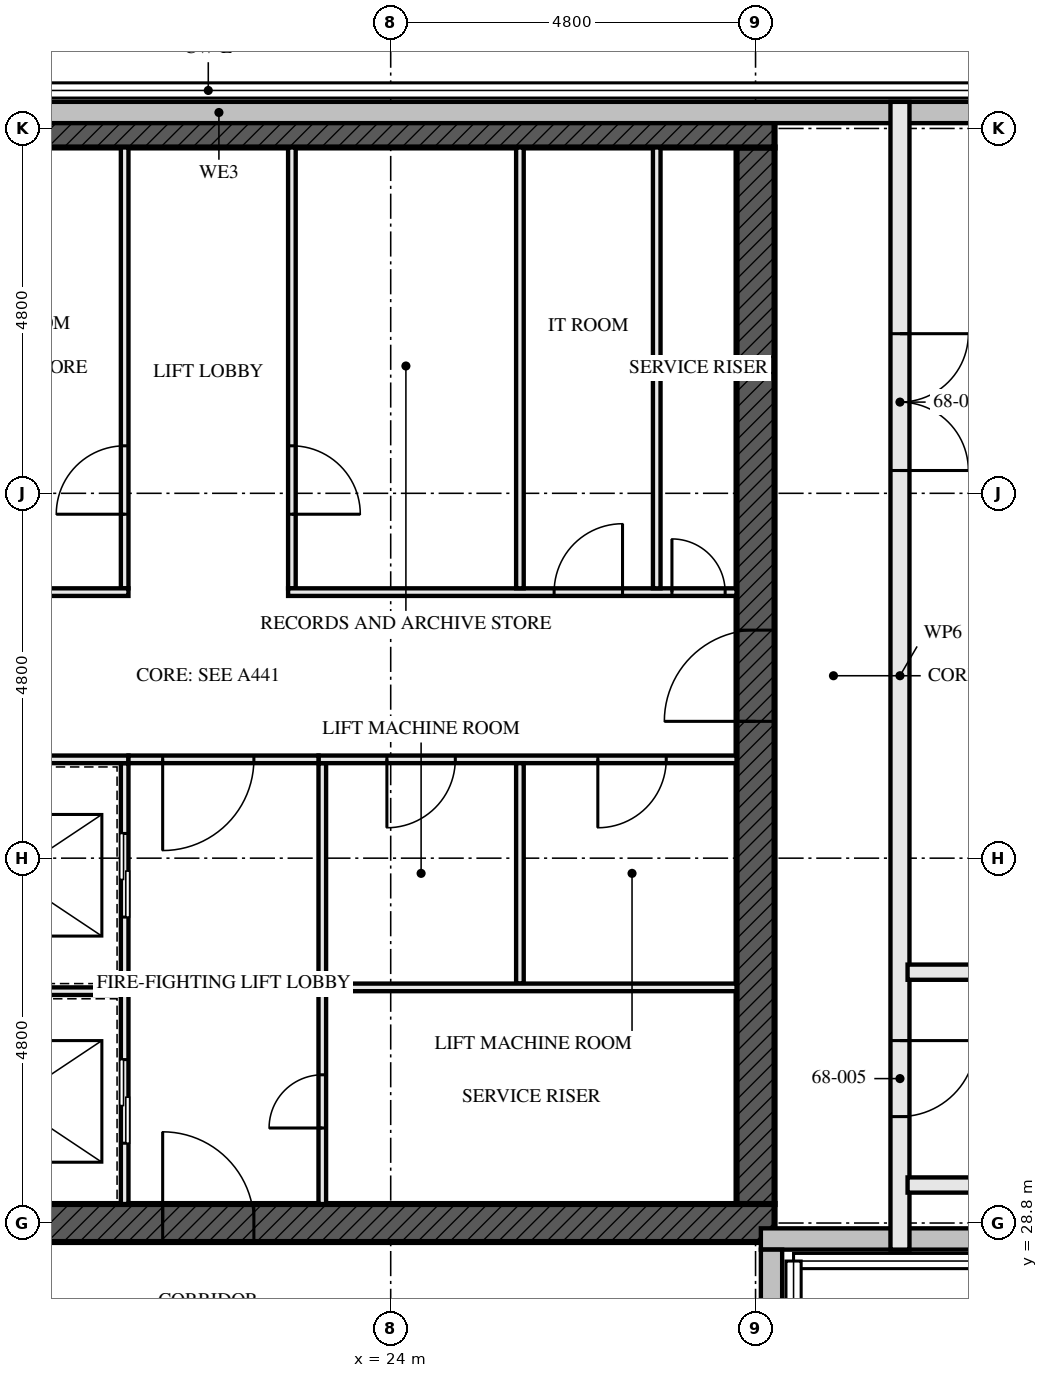
"""IFC4 building model, lengths in metres.
Left out: names, types, materials, properties, quantities, classifications, styles, units other than length and angle.
Written with IfcOpenShell. Run it as: python <this file> out.ifc"""

import sys

from ifc_helpers import new_model, si_unit, direction, frame, frame_2d, origin, place, context, subcontext, project, spatial, rectangle, extrude, element, fill, save


model = new_model("IFC4")
c1 = context("Model", 3, precision=1e-05, world=origin(), true_north=direction((0.0, 1.0)))
c2 = subcontext(c1, "Body", "Model", "MODEL_VIEW")
j1 = project(units=[si_unit("LENGTHUNIT", "METRE"), si_unit("PLANEANGLEUNIT", "RADIAN")], contexts=[c1])
p1 = place(None, origin())
s1 = spatial("IfcSite", under=j1, at=p1, CompositionType="ELEMENT")
p2 = place(p1, origin())
s2 = spatial("IfcBuilding", under=s1, at=p2, CompositionType="ELEMENT")
p3 = place(p2, frame((0.0, 0.0, 248.0)))
s3 = spatial("IfcBuildingStorey", under=s2, at=p3, CompositionType="ELEMENT", Elevation=248.0)
p4 = place(p3, frame((14.15, 28.8, -0.25), z_axis=(0.0, 0.0, 1.0), x_axis=(1.0, 0.0, 0.0)))
e1 = element("IfcWall", 1, at=p4, inside=s3, PredefinedType="SHEAR", context=c2, shape_type="SweptSolid", body=[
    extrude(rectangle(XDim=14.9, YDim=0.5, at=frame_2d((7.45, 0.0))), origin(), (0.0, 0.0, 1.0), 4.5),
])
p5 = place(p4, frame((6.85, 0.0, 0.25)))
e2 = element("IfcOpeningElement", 2, at=p5, cuts=e1, PredefinedType="OPENING", context=c2, shape_type="SweptSolid", body=[
    extrude(rectangle(XDim=1.2, YDim=2.1, at=frame_2d((0.6, 1.05))), frame((0.0, 0.26, 0.0), z_axis=(0.0, -1.0, 0.0), x_axis=(1.0, 0.0, 0.0)), (0.0, 0.0, 1.0), 0.521),
])
p6 = place(p3, frame((29.05, 43.2, -0.25), z_axis=(0.0, 0.0, 1.0), x_axis=(-1.0, 0.0, 0.0)))
e3 = element("IfcWall", 3, at=p6, inside=s3, PredefinedType="SHEAR", context=c2, shape_type="SweptSolid", body=[
    extrude(rectangle(XDim=14.9, YDim=0.5, at=frame_2d((7.45, 0.0))), origin(), (0.0, 0.0, 1.0), 4.5),
])
p7 = place(p3, frame((28.8, 29.05, -0.25), z_axis=(0.0, 0.0, 1.0), x_axis=(0.0, 1.0, 0.0)))
e4 = element("IfcWall", 4, at=p7, inside=s3, PredefinedType="SHEAR", context=c2, shape_type="SweptSolid", body=[
    extrude(rectangle(XDim=13.9, YDim=0.5, at=frame_2d((6.95, 0.0))), origin(), (0.0, 0.0, 1.0), 4.5),
])
p8 = place(p7, frame((6.35, 0.0, 0.25)))
e5 = element("IfcOpeningElement", 5, at=p8, cuts=e4, PredefinedType="OPENING", context=c2, shape_type="SweptSolid", body=[
    extrude(rectangle(XDim=1.2, YDim=2.1, at=frame_2d((0.6, 1.05))), frame((0.0, 0.26, 0.0), z_axis=(0.0, -1.0, 0.0), x_axis=(1.0, 0.0, 0.0)), (0.0, 0.0, 1.0), 0.521),
])
p9 = place(p3, frame((28.87, 28.59, 4.5), z_axis=(0.0, 0.0, 1.0), x_axis=(1.0, 0.0, 0.0)))
e6 = element("IfcWall", 6, at=p9, inside=s3, PredefinedType="PARAPET", context=c2, shape_type="SweptSolid", body=[
    extrude(rectangle(XDim=9.6, YDim=0.28, at=frame_2d((4.8, 0.0))), origin(), (0.0, 0.0, 1.0), 1.1),
])
p10 = place(p3, frame((38.75, 43.41, 4.5), z_axis=(0.0, 0.0, 1.0), x_axis=(-1.0, 0.0, 0.0)))
e7 = element("IfcWall", 7, at=p10, inside=s3, PredefinedType="PARAPET", context=c2, shape_type="SweptSolid", body=[
    extrude(rectangle(XDim=34.02, YDim=0.28, at=frame_2d((17.01, 0.0))), origin(), (0.0, 0.0, 1.0), 1.1),
])
p11 = place(p3, frame((29.01, 18.85, 4.5), z_axis=(0.0, 0.0, 1.0), x_axis=(0.0, 1.0, 0.0)))
e8 = element("IfcWall", 8, at=p11, inside=s3, PredefinedType="PARAPET", context=c2, shape_type="SweptSolid", body=[
    extrude(rectangle(XDim=9.6, YDim=0.28, at=frame_2d((4.8, 0.0))), origin(), (0.0, 0.0, 1.0), 1.1),
])
for number, where, z_axis, x_axis in (
    (9, (37.0, 29.3, 0.0), (0.0, 0.0, 1.0), (-1.0, 0.0, 0.0)),
    (10, (37.0, 32.1, 0.0), (0.0, 0.0, 1.0), (-1.0, 0.0, 0.0)),
):
    element("IfcWall", number, at=place(p3, frame(where, z_axis=z_axis, x_axis=x_axis)), inside=s3, PredefinedType="SOLIDWALL", context=c2, shape_type="SweptSolid", body=[
        extrude(rectangle(XDim=6.2, YDim=0.2, at=frame_2d((3.1, 0.0))), origin(), (0.0, 0.0, 1.0), 4.25),
    ])
p12 = place(p3, frame((30.7, 28.45, 0.0), z_axis=(0.0, 0.0, 1.0), x_axis=(0.0, 1.0, 0.0)))
e11 = element("IfcWall", 11, at=p12, inside=s3, PredefinedType="SOLIDWALL", context=c2, shape_type="SweptSolid", body=[
    extrude(rectangle(XDim=15.1, YDim=0.25, at=frame_2d((7.55, 0.0))), origin(), (0.0, 0.0, 1.0), 3.34),
])
p13 = place(p12, frame((1.75, 0.0, 0.0)))
e12 = element("IfcOpeningElement", 12, at=p13, cuts=e11, PredefinedType="OPENING", context=c2, shape_type="SweptSolid", body=[
    extrude(rectangle(XDim=1.0, YDim=2.1, at=frame_2d((0.5, 1.05))), frame((0.0, 0.135, 0.0), z_axis=(0.0, -1.0, 0.0), x_axis=(1.0, 0.0, 0.0)), (0.0, 0.0, 1.0), 0.271),
])
p14 = place(p12, frame((10.25, 0.0, 0.0)))
e13 = element("IfcOpeningElement", 13, at=p14, cuts=e11, PredefinedType="OPENING", context=c2, shape_type="SweptSolid", body=[
    extrude(rectangle(XDim=1.8, YDim=2.4, at=frame_2d((0.9, 1.2))), frame((0.0, 0.135, 0.0), z_axis=(0.0, -1.0, 0.0), x_axis=(1.0, 0.0, 0.0)), (0.0, 0.0, 1.0), 0.271),
])
p15 = place(p3, frame((27.5, 37.15, 0.0), z_axis=(0.0, 0.0, 1.0), x_axis=(0.0, 1.0, 0.0)))
e14 = element("IfcWall", 14, at=p15, inside=s3, PredefinedType="SOLIDWALL", context=c2, shape_type="SweptSolid", body=[
    extrude(rectangle(XDim=5.8, YDim=0.1, at=frame_2d((2.9, 0.0))), origin(), (0.0, 0.0, 1.0), 4.25),
])
p16 = place(p3, frame((20.5, 29.05, 0.0), z_axis=(0.0, 0.0, 1.0), x_axis=(0.0, 1.0, 0.0)))
e15 = element("IfcWall", 15, at=p16, inside=s3, PredefinedType="SOLIDWALL", context=c2, shape_type="SweptSolid", body=[
    extrude(rectangle(XDim=5.8, YDim=0.1, at=frame_2d((2.9, 0.0))), origin(), (0.0, 0.0, 1.0), 4.25),
])
p17 = place(p16, frame((0.8, 0.0, 0.0)))
e16 = element("IfcOpeningElement", 16, at=p17, cuts=e15, PredefinedType="OPENING", context=c2, shape_type="SweptSolid", body=[
    extrude(rectangle(XDim=1.1, YDim=2.3, at=frame_2d((0.55, 1.15))), frame((0.0, 0.061, 0.0), z_axis=(0.0, -1.0, 0.0), x_axis=(1.0, 0.0, 0.0)), (0.0, 0.0, 1.0), 0.121),
])
p18 = place(p16, frame((3.775, 0.0, 0.0)))
e17 = element("IfcOpeningElement", 17, at=p18, cuts=e15, PredefinedType="OPENING", context=c2, shape_type="SweptSolid", body=[
    extrude(rectangle(XDim=1.1, YDim=2.3, at=frame_2d((0.55, 1.15))), frame((0.0, 0.061, 0.0), z_axis=(0.0, -1.0, 0.0), x_axis=(1.0, 0.0, 0.0)), (0.0, 0.0, 1.0), 0.121),
])
p19 = place(p3, frame((20.5, 37.15, 0.0), z_axis=(0.0, 0.0, 1.0), x_axis=(0.0, 1.0, 0.0)))
e18 = element("IfcWall", 18, at=p19, inside=s3, PredefinedType="SOLIDWALL", context=c2, shape_type="SweptSolid", body=[
    extrude(rectangle(XDim=5.8, YDim=0.1, at=frame_2d((2.9, 0.0))), origin(), (0.0, 0.0, 1.0), 4.25),
])
p20 = place(p19, frame((0.975, 0.0, 0.0)))
e19 = element("IfcOpeningElement", 19, at=p20, cuts=e18, PredefinedType="OPENING", context=c2, shape_type="SweptSolid", body=[
    extrude(rectangle(XDim=0.9, YDim=2.1, at=frame_2d((0.45, 1.05))), frame((0.0, 0.061, 0.0), z_axis=(0.0, -1.0, 0.0), x_axis=(1.0, 0.0, 0.0)), (0.0, 0.0, 1.0), 0.121),
])
p21 = place(p3, frame((22.7, 37.15, 0.0), z_axis=(0.0, 0.0, 1.0), x_axis=(0.0, 1.0, 0.0)))
e20 = element("IfcWall", 20, at=p21, inside=s3, PredefinedType="SOLIDWALL", context=c2, shape_type="SweptSolid", body=[
    extrude(rectangle(XDim=5.8, YDim=0.1, at=frame_2d((2.9, 0.0))), origin(), (0.0, 0.0, 1.0), 4.25),
])
p22 = place(p21, frame((0.975, 0.0, 0.0)))
e21 = element("IfcOpeningElement", 21, at=p22, cuts=e20, PredefinedType="OPENING", context=c2, shape_type="SweptSolid", body=[
    extrude(rectangle(XDim=0.9, YDim=2.1, at=frame_2d((0.45, 1.05))), frame((0.0, 0.061, 0.0), z_axis=(0.0, -1.0, 0.0), x_axis=(1.0, 0.0, 0.0)), (0.0, 0.0, 1.0), 0.121),
])
p23 = place(p3, frame((23.1, 29.05, 0.0), z_axis=(0.0, 0.0, 1.0), x_axis=(0.0, 1.0, 0.0)))
e22 = element("IfcWall", 22, at=p23, inside=s3, PredefinedType="SOLIDWALL", context=c2, shape_type="SweptSolid", body=[
    extrude(rectangle(XDim=5.8, YDim=0.1, at=frame_2d((2.9, 0.0))), origin(), (0.0, 0.0, 1.0), 4.25),
])
p24 = place(p23, frame((1.0, 0.0, 0.0)))
e23 = element("IfcOpeningElement", 23, at=p24, cuts=e22, PredefinedType="OPENING", context=c2, shape_type="SweptSolid", body=[
    extrude(rectangle(XDim=0.7, YDim=2.1, at=frame_2d((0.35, 1.05))), frame((0.0, 0.061, 0.0), z_axis=(0.0, -1.0, 0.0), x_axis=(1.0, 0.0, 0.0)), (0.0, 0.0, 1.0), 0.121),
])
p25 = place(p3, frame((14.65, 34.9, 0.0), z_axis=(0.0, 0.0, 1.0), x_axis=(1.0, 0.0, 0.0)))
e24 = element("IfcWall", 24, at=p25, inside=s3, PredefinedType="SOLIDWALL", context=c2, shape_type="SweptSolid", body=[
    extrude(rectangle(XDim=5.9, YDim=0.1, at=frame_2d((2.95, 0.0))), origin(), (0.0, 0.0, 1.0), 4.25),
])
p26 = place(p25, frame((1.6, 0.0, 0.0)))
e25 = element("IfcOpeningElement", 25, at=p26, cuts=e24, PredefinedType="OPENING", context=c2, shape_type="SweptSolid", body=[
    extrude(rectangle(XDim=0.7, YDim=2.1, at=frame_2d((0.35, 1.05))), frame((0.0, 0.061, 0.0), z_axis=(0.0, -1.0, 0.0), x_axis=(1.0, 0.0, 0.0)), (0.0, 0.0, 1.0), 0.121),
])
p27 = place(p3, frame((23.05, 34.9, 0.0), z_axis=(0.0, 0.0, 1.0), x_axis=(1.0, 0.0, 0.0)))
e26 = element("IfcWall", 26, at=p27, inside=s3, PredefinedType="SOLIDWALL", context=c2, shape_type="SweptSolid", body=[
    extrude(rectangle(XDim=5.5, YDim=0.1, at=frame_2d((2.75, 0.0))), origin(), (0.0, 0.0, 1.0), 4.25),
])
p28 = place(p27, frame((0.9, 0.0, 0.0)))
e27 = element("IfcOpeningElement", 27, at=p28, cuts=e26, PredefinedType="OPENING", context=c2, shape_type="SweptSolid", body=[
    extrude(rectangle(XDim=0.9, YDim=2.1, at=frame_2d((0.45, 1.05))), frame((0.0, 0.061, 0.0), z_axis=(0.0, -1.0, 0.0), x_axis=(1.0, 0.0, 0.0)), (0.0, 0.0, 1.0), 0.121),
])
p29 = place(p27, frame((3.675, 0.0, 0.0)))
e28 = element("IfcOpeningElement", 28, at=p29, cuts=e26, PredefinedType="OPENING", context=c2, shape_type="SweptSolid", body=[
    extrude(rectangle(XDim=0.9, YDim=2.1, at=frame_2d((0.45, 1.05))), frame((0.0, 0.061, 0.0), z_axis=(0.0, -1.0, 0.0), x_axis=(1.0, 0.0, 0.0)), (0.0, 0.0, 1.0), 0.121),
])
p30 = place(p3, frame((14.65, 37.1, 0.0), z_axis=(0.0, 0.0, 1.0), x_axis=(1.0, 0.0, 0.0)))
e29 = element("IfcWall", 29, at=p30, inside=s3, PredefinedType="SOLIDWALL", context=c2, shape_type="SweptSolid", body=[
    extrude(rectangle(XDim=5.9, YDim=0.1, at=frame_2d((2.95, 0.0))), origin(), (0.0, 0.0, 1.0), 4.25),
])
p31 = place(p30, frame((0.15, 0.0, 0.0)))
e30 = element("IfcOpeningElement", 30, at=p31, cuts=e29, PredefinedType="OPENING", context=c2, shape_type="SweptSolid", body=[
    extrude(rectangle(XDim=0.7, YDim=2.1, at=frame_2d((0.35, 1.05))), frame((0.0, 0.061, 0.0), z_axis=(0.0, -1.0, 0.0), x_axis=(1.0, 0.0, 0.0)), (0.0, 0.0, 1.0), 0.121),
])
p32 = place(p30, frame((1.5, 0.0, 0.0)))
e31 = element("IfcOpeningElement", 31, at=p32, cuts=e29, PredefinedType="OPENING", context=c2, shape_type="SweptSolid", body=[
    extrude(rectangle(XDim=0.9, YDim=2.1, at=frame_2d((0.45, 1.05))), frame((0.0, 0.061, 0.0), z_axis=(0.0, -1.0, 0.0), x_axis=(1.0, 0.0, 0.0)), (0.0, 0.0, 1.0), 0.121),
])
p33 = place(p3, frame((22.65, 37.1, 0.0), z_axis=(0.0, 0.0, 1.0), x_axis=(1.0, 0.0, 0.0)))
e32 = element("IfcWall", 32, at=p33, inside=s3, PredefinedType="SOLIDWALL", context=c2, shape_type="SweptSolid", body=[
    extrude(rectangle(XDim=5.9, YDim=0.1, at=frame_2d((2.95, 0.0))), origin(), (0.0, 0.0, 1.0), 4.25),
])
p34 = place(p33, frame((3.5, 0.0, 0.0)))
e33 = element("IfcOpeningElement", 33, at=p34, cuts=e32, PredefinedType="OPENING", context=c2, shape_type="SweptSolid", body=[
    extrude(rectangle(XDim=0.9, YDim=2.1, at=frame_2d((0.45, 1.05))), frame((0.0, 0.061, 0.0), z_axis=(0.0, -1.0, 0.0), x_axis=(1.0, 0.0, 0.0)), (0.0, 0.0, 1.0), 0.121),
])
p35 = place(p33, frame((5.05, 0.0, 0.0)))
e34 = element("IfcOpeningElement", 34, at=p35, cuts=e32, PredefinedType="OPENING", context=c2, shape_type="SweptSolid", body=[
    extrude(rectangle(XDim=0.7, YDim=2.1, at=frame_2d((0.35, 1.05))), frame((0.0, 0.061, 0.0), z_axis=(0.0, -1.0, 0.0), x_axis=(1.0, 0.0, 0.0)), (0.0, 0.0, 1.0), 0.121),
])
p36 = place(p3, frame((20.55, 34.9, 0.0), z_axis=(0.0, 0.0, 1.0), x_axis=(1.0, 0.0, 0.0)))
e35 = element("IfcWall", 35, at=p36, inside=s3, PredefinedType="SOLIDWALL", context=c2, shape_type="SweptSolid", body=[
    extrude(rectangle(XDim=2.5, YDim=0.1, at=frame_2d((1.25, 0.0))), origin(), (0.0, 0.0, 1.0), 3.04),
])
p37 = place(p36, frame((0.45, 0.0, 0.0)))
e36 = element("IfcOpeningElement", 36, at=p37, cuts=e35, PredefinedType="OPENING", context=c2, shape_type="SweptSolid", body=[
    extrude(rectangle(XDim=1.2, YDim=2.1, at=frame_2d((0.6, 1.05))), frame((0.0, 0.061, 0.0), z_axis=(0.0, -1.0, 0.0), x_axis=(1.0, 0.0, 0.0)), (0.0, 0.0, 1.0), 0.121),
])
p38 = place(p3, frame((17.55, 31.85, 0.0), z_axis=(0.0, 0.0, 1.0), x_axis=(1.0, 0.0, 0.0)))
e37 = element("IfcWall", 37, at=p38, inside=s3, PredefinedType="SOLIDWALL", context=c2, shape_type="SweptSolid", body=[
    extrude(rectangle(XDim=2.9, YDim=0.1, at=frame_2d((1.45, 0.0))), origin(), (0.0, 0.0, 1.0), 4.25),
])
p39 = place(p3, frame((25.7, 37.15, 0.0), z_axis=(0.0, 0.0, 1.0), x_axis=(0.0, 1.0, 0.0)))
e38 = element("IfcWall", 38, at=p39, inside=s3, PredefinedType="SOLIDWALL", context=c2, shape_type="SweptSolid", body=[
    extrude(rectangle(XDim=5.8, YDim=0.1, at=frame_2d((2.9, 0.0))), origin(), (0.0, 0.0, 1.0), 4.25),
])
p40 = place(p3, frame((25.7, 31.95, 0.0), z_axis=(0.0, 0.0, 1.0), x_axis=(0.0, 1.0, 0.0)))
e39 = element("IfcWall", 39, at=p40, inside=s3, PredefinedType="SOLIDWALL", context=c2, shape_type="SweptSolid", body=[
    extrude(rectangle(XDim=2.9, YDim=0.1, at=frame_2d((1.45, 0.0))), origin(), (0.0, 0.0, 1.0), 4.25),
])
p41 = place(p3, frame((23.15, 31.9, 0.0), z_axis=(0.0, 0.0, 1.0), x_axis=(1.0, 0.0, 0.0)))
e40 = element("IfcWall", 40, at=p41, inside=s3, PredefinedType="SOLIDWALL", context=c2, shape_type="SweptSolid", body=[
    extrude(rectangle(XDim=5.4, YDim=0.1, at=frame_2d((2.7, 0.0))), origin(), (0.0, 0.0, 1.0), 4.25),
])
p42 = place(p13, frame((1.0, 0.0, 0.0), z_axis=(0.0, 0.0, 1.0), x_axis=(-1.0, 0.0, 0.0)))
e41 = element("IfcDoor", 41, at=p42, inside=s3, OperationType="SINGLE_SWING_RIGHT", PredefinedType="DOOR", context=c2, shape_type="SweptSolid", body=[
    extrude(rectangle(XDim=1.0, YDim=2.1, at=frame_2d((0.5, 1.05))), frame((0.0, 0.032, 0.0), z_axis=(0.0, -1.0, 0.0), x_axis=(1.0, 0.0, 0.0)), (0.0, 0.0, 1.0), 0.064),
])
fill(e12, e41)
p43 = place(p14, frame((1.8, 0.0, 0.0), z_axis=(0.0, 0.0, 1.0), x_axis=(-1.0, 0.0, 0.0)))
e42 = element("IfcDoor", 42, at=p43, inside=s3, OperationType="DOUBLE_DOOR_SINGLE_SWING", PredefinedType="DOOR", context=c2, shape_type="SweptSolid", body=[
    extrude(rectangle(XDim=1.8, YDim=2.4, at=frame_2d((0.9, 1.2))), frame((0.0, 0.032, 0.0), z_axis=(0.0, -1.0, 0.0), x_axis=(1.0, 0.0, 0.0)), (0.0, 0.0, 1.0), 0.064),
])
fill(e13, e42)
p44 = place(p17, origin())
e43 = element("IfcDoor", 43, at=p44, inside=s3, OperationType="SLIDING_TO_LEFT", PredefinedType="DOOR", context=c2, shape_type="SweptSolid", body=[
    extrude(rectangle(XDim=1.1, YDim=2.3, at=frame_2d((0.55, 1.15))), frame((0.0, 0.05, 0.0), z_axis=(0.0, -1.0, 0.0), x_axis=(1.0, 0.0, 0.0)), (0.0, 0.0, 1.0), 0.1),
])
fill(e16, e43)
p45 = place(p18, origin())
e44 = element("IfcDoor", 44, at=p45, inside=s3, OperationType="SLIDING_TO_LEFT", PredefinedType="DOOR", context=c2, shape_type="SweptSolid", body=[
    extrude(rectangle(XDim=1.1, YDim=2.3, at=frame_2d((0.55, 1.15))), frame((0.0, 0.05, 0.0), z_axis=(0.0, -1.0, 0.0), x_axis=(1.0, 0.0, 0.0)), (0.0, 0.0, 1.0), 0.1),
])
fill(e17, e44)
p46 = place(p20, origin())
e45 = element("IfcDoor", 45, at=p46, inside=s3, OperationType="SINGLE_SWING_RIGHT", PredefinedType="DOOR", context=c2, shape_type="SweptSolid", body=[
    extrude(rectangle(XDim=0.9, YDim=2.1, at=frame_2d((0.45, 1.05))), frame((0.0, 0.027, 0.0), z_axis=(0.0, -1.0, 0.0), x_axis=(1.0, 0.0, 0.0)), (0.0, 0.0, 1.0), 0.054),
])
fill(e19, e45)
p47 = place(p22, frame((0.9, 0.0, 0.0), z_axis=(0.0, 0.0, 1.0), x_axis=(-1.0, 0.0, 0.0)))
e46 = element("IfcDoor", 46, at=p47, inside=s3, OperationType="SINGLE_SWING_LEFT", PredefinedType="DOOR", context=c2, shape_type="SweptSolid", body=[
    extrude(rectangle(XDim=0.9, YDim=2.1, at=frame_2d((0.45, 1.05))), frame((0.0, 0.027, 0.0), z_axis=(0.0, -1.0, 0.0), x_axis=(1.0, 0.0, 0.0)), (0.0, 0.0, 1.0), 0.054),
])
fill(e21, e46)
p48 = place(p24, origin())
e47 = element("IfcDoor", 47, at=p48, inside=s3, OperationType="SINGLE_SWING_RIGHT", PredefinedType="DOOR", context=c2, shape_type="SweptSolid", body=[
    extrude(rectangle(XDim=0.7, YDim=2.1, at=frame_2d((0.35, 1.05))), frame((0.0, 0.027, 0.0), z_axis=(0.0, -1.0, 0.0), x_axis=(1.0, 0.0, 0.0)), (0.0, 0.0, 1.0), 0.054),
])
fill(e23, e47)
p49 = place(p28, frame((0.9, 0.0, 0.0), z_axis=(0.0, 0.0, 1.0), x_axis=(-1.0, 0.0, 0.0)))
e48 = element("IfcDoor", 48, at=p49, inside=s3, OperationType="SINGLE_SWING_LEFT", PredefinedType="DOOR", context=c2, shape_type="SweptSolid", body=[
    extrude(rectangle(XDim=0.9, YDim=2.1, at=frame_2d((0.45, 1.05))), frame((0.0, 0.027, 0.0), z_axis=(0.0, -1.0, 0.0), x_axis=(1.0, 0.0, 0.0)), (0.0, 0.0, 1.0), 0.054),
])
fill(e27, e48)
p50 = place(p29, frame((0.9, 0.0, 0.0), z_axis=(0.0, 0.0, 1.0), x_axis=(-1.0, 0.0, 0.0)))
e49 = element("IfcDoor", 49, at=p50, inside=s3, OperationType="SINGLE_SWING_LEFT", PredefinedType="DOOR", context=c2, shape_type="SweptSolid", body=[
    extrude(rectangle(XDim=0.9, YDim=2.1, at=frame_2d((0.45, 1.05))), frame((0.0, 0.027, 0.0), z_axis=(0.0, -1.0, 0.0), x_axis=(1.0, 0.0, 0.0)), (0.0, 0.0, 1.0), 0.054),
])
fill(e28, e49)
p51 = place(p34, origin())
e50 = element("IfcDoor", 50, at=p51, inside=s3, OperationType="SINGLE_SWING_LEFT", PredefinedType="DOOR", context=c2, shape_type="SweptSolid", body=[
    extrude(rectangle(XDim=0.9, YDim=2.1, at=frame_2d((0.45, 1.05))), frame((0.0, 0.027, 0.0), z_axis=(0.0, -1.0, 0.0), x_axis=(1.0, 0.0, 0.0)), (0.0, 0.0, 1.0), 0.054),
])
fill(e33, e50)
p52 = place(p35, origin())
e51 = element("IfcDoor", 51, at=p52, inside=s3, OperationType="SINGLE_SWING_RIGHT", PredefinedType="DOOR", context=c2, shape_type="SweptSolid", body=[
    extrude(rectangle(XDim=0.7, YDim=2.1, at=frame_2d((0.35, 1.05))), frame((0.0, 0.027, 0.0), z_axis=(0.0, -1.0, 0.0), x_axis=(1.0, 0.0, 0.0)), (0.0, 0.0, 1.0), 0.054),
])
fill(e34, e51)
p53 = place(p37, frame((1.2, 0.0, 0.0), z_axis=(0.0, 0.0, 1.0), x_axis=(-1.0, 0.0, 0.0)))
e52 = element("IfcDoor", 52, at=p53, inside=s3, OperationType="SINGLE_SWING_LEFT", PredefinedType="DOOR", context=c2, shape_type="SweptSolid", body=[
    extrude(rectangle(XDim=1.2, YDim=2.1, at=frame_2d((0.6, 1.05))), frame((0.0, 0.027, 0.0), z_axis=(0.0, -1.0, 0.0), x_axis=(1.0, 0.0, 0.0)), (0.0, 0.0, 1.0), 0.054),
])
fill(e36, e52)
p54 = place(p5, origin())
e53 = element("IfcDoor", 53, at=p54, inside=s3, OperationType="SINGLE_SWING_LEFT", PredefinedType="DOOR", context=c2, shape_type="SweptSolid", body=[
    extrude(rectangle(XDim=1.2, YDim=2.1, at=frame_2d((0.6, 1.05))), frame((0.0, 0.027, 0.0), z_axis=(0.0, -1.0, 0.0), x_axis=(1.0, 0.0, 0.0)), (0.0, 0.0, 1.0), 0.054),
])
fill(e2, e53)
p55 = place(p8, origin())
e54 = element("IfcDoor", 54, at=p55, inside=s3, OperationType="SINGLE_SWING_LEFT", PredefinedType="DOOR", context=c2, shape_type="SweptSolid", body=[
    extrude(rectangle(XDim=1.2, YDim=2.1, at=frame_2d((0.6, 1.05))), frame((0.0, 0.027, 0.0), z_axis=(0.0, -1.0, 0.0), x_axis=(1.0, 0.0, 0.0)), (0.0, 0.0, 1.0), 0.054),
])
fill(e5, e54)
save(model, sys.argv[1])
